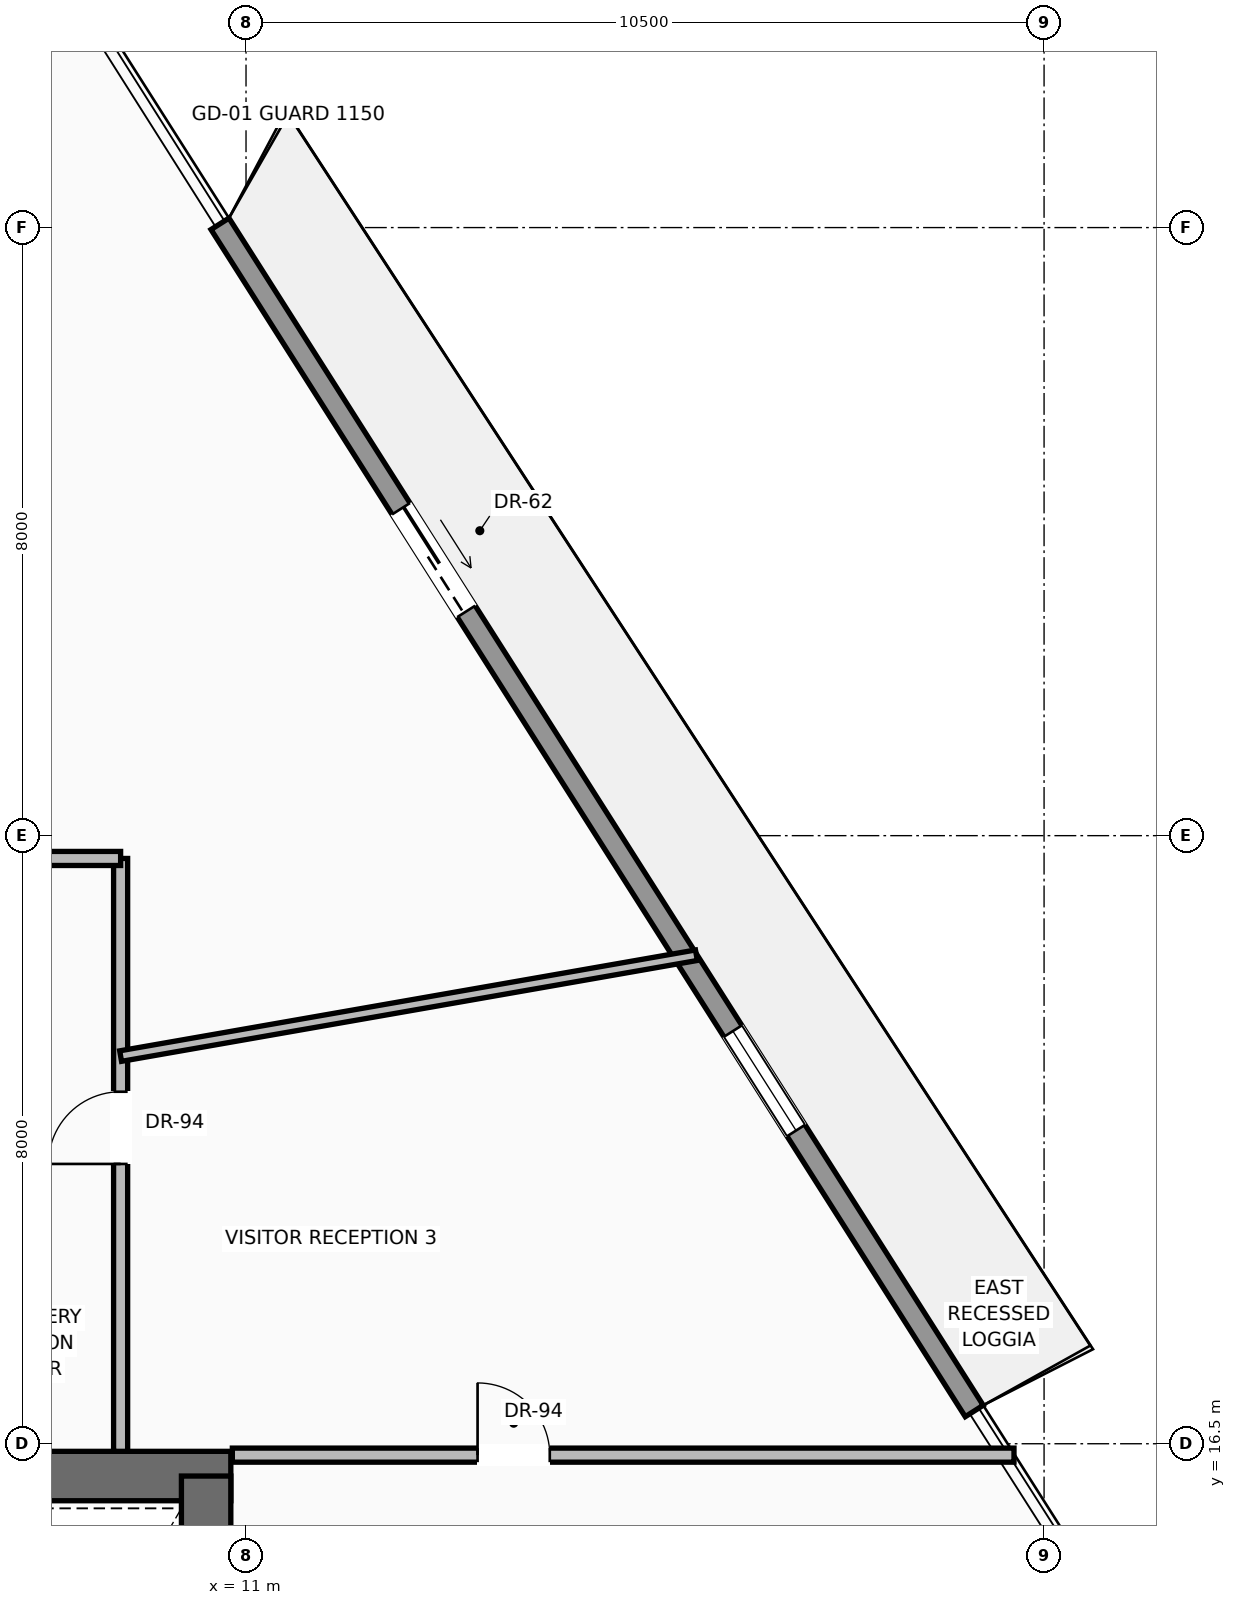
"""IFC4 building model, lengths in metres.
Left out: names, types, materials, properties, quantities, classifications, styles, units other than length and angle.
Written with IfcOpenShell. Run it as: python <this file> out.ifc"""

import sys

from ifc_helpers import new_model, si_unit, direction, frame, frame_2d, origin, place, context, subcontext, project, spatial, rectangle, extrude, source, transform, mapped, element, fill, save


model = new_model("IFC4")
c1 = context("Model", 3, precision=1e-05, world=origin(), true_north=direction((0.0, 1.0)))
c2 = subcontext(c1, "Body", "Model", "MODEL_VIEW")
j1 = project(units=[si_unit("LENGTHUNIT", "METRE"), si_unit("PLANEANGLEUNIT", "RADIAN")], contexts=[c1])
p1 = place(None, origin())
s1 = spatial("IfcSite", under=j1, at=p1, CompositionType="ELEMENT")
p2 = place(p1, origin())
s2 = spatial("IfcBuilding", under=s1, at=p2, CompositionType="ELEMENT")
p3 = place(p2, frame((0.0, 0.0, 162.6)))
s3 = spatial("IfcBuildingStorey", under=s2, at=p3, CompositionType="ELEMENT", Elevation=162.6)
p4 = place(p3, frame((-10.8, 16.075, 0.0), z_axis=(0.0, 0.0, 1.0), x_axis=(1.0, 0.0, 0.0)))
e1 = element("IfcWall", 1, at=p4, inside=s3, PredefinedType="SHEAR", context=c2, shape_type="SweptSolid", body=[
    extrude(rectangle(XDim=21.6, YDim=0.65, at=frame_2d((10.8, 0.0))), origin(), (0.0, 0.0, 1.0), 3.4),
])
p5 = place(p4, frame((3.37, 0.0, 0.0)))
e2 = element("IfcOpeningElement", 2, at=p5, cuts=e1, PredefinedType="OPENING", context=c2, shape_type="SweptSolid", body=[
    extrude(rectangle(XDim=1.3, YDim=2.3, at=frame_2d((0.65, 1.15))), frame((0.0, 0.335, 0.0), z_axis=(0.0, -1.0, 0.0), x_axis=(1.0, 0.0, 0.0)), (0.0, 0.0, 1.0), 0.67),
])
p6 = place(p4, frame((9.8, 0.0, 0.0)))
e3 = element("IfcOpeningElement", 3, at=p6, cuts=e1, PredefinedType="OPENING", context=c2, shape_type="SweptSolid", body=[
    extrude(rectangle(XDim=2.0, YDim=2.4, at=frame_2d((1.0, 1.2))), frame((0.0, 0.335, 0.0), z_axis=(0.0, -1.0, 0.0), x_axis=(1.0, 0.0, 0.0)), (0.0, 0.0, 1.0), 0.67),
])
p7 = place(p3, frame((10.475, 0.525, 0.0), z_axis=(0.0, 0.0, 1.0), x_axis=(0.0, 1.0, 0.0)))
e4 = element("IfcWall", 4, at=p7, inside=s3, PredefinedType="SHEAR", context=c2, shape_type="SweptSolid", body=[
    extrude(rectangle(XDim=15.55, YDim=0.65, at=frame_2d((7.775, 0.0))), origin(), (0.0, 0.0, 1.0), 3.4),
])
p8 = place(p3, frame((10.658, 32.549, 0.0), z_axis=(0.0, 0.0, 1.0), x_axis=(0.536276914683, -0.844042102491, 0.0)))
e5 = element("IfcWall", 5, at=p8, inside=s3, PredefinedType="SOLIDWALL", context=c2, shape_type="SweptSolid", body=[
    extrude(rectangle(XDim=18.505, YDim=0.28, at=frame_2d((9.252, 0.0))), origin(), (0.0, 0.0, 1.0), 2.98),
])
p9 = place(p8, frame((4.441, 0.0, 0.0)))
e6 = element("IfcOpeningElement", 6, at=p9, cuts=e5, PredefinedType="OPENING", context=c2, shape_type="SweptSolid", body=[
    extrude(rectangle(XDim=1.6, YDim=2.35, at=frame_2d((0.8, 1.175))), frame((0.0, 0.15, 0.0), z_axis=(0.0, -1.0, 0.0), x_axis=(1.0, 0.0, 0.0)), (0.0, 0.0, 1.0), 0.3),
])
p10 = place(p8, frame((12.583, 0.0, 0.9)))
e7 = element("IfcOpeningElement", 7, at=p10, cuts=e5, PredefinedType="OPENING", context=c2, shape_type="SweptSolid", body=[
    extrude(rectangle(XDim=1.55, YDim=1.85, at=frame_2d((0.775, 0.925))), frame((0.0, 0.15, 0.0), z_axis=(0.0, -1.0, 0.0), x_axis=(1.0, 0.0, 0.0)), (0.0, 0.0, 1.0), 0.3),
])
p11 = place(p3, frame((9.35, 16.4, 0.0), z_axis=(0.0, 0.0, 1.0), x_axis=(0.0, 1.0, 0.0)))
e8 = element("IfcWall", 8, at=p11, inside=s3, PredefinedType="PARTITIONING", context=c2, shape_type="SweptSolid", body=[
    extrude(rectangle(XDim=7.8, YDim=0.185, at=frame_2d((3.9, 0.0))), origin(), (0.0, 0.0, 1.0), 3.392),
])
p12 = place(p11, frame((3.781, 0.0, 0.0)))
e9 = element("IfcOpeningElement", 9, at=p12, cuts=e8, PredefinedType="OPENING", context=c2, shape_type="SweptSolid", body=[
    extrude(rectangle(XDim=0.95, YDim=2.2, at=frame_2d((0.475, 1.1))), frame((0.0, 0.103, 0.0), z_axis=(0.0, -1.0, 0.0), x_axis=(1.0, 0.0, 0.0)), (0.0, 0.0, 1.0), 0.205),
])
p13 = place(p3, frame((7.15, 24.2, 0.0), z_axis=(0.0, 0.0, 1.0), x_axis=(1.0, 0.0, 0.0)))
e10 = element("IfcWall", 10, at=p13, inside=s3, PredefinedType="PARTITIONING", context=c2, shape_type="SweptSolid", body=[
    extrude(rectangle(XDim=2.2, YDim=0.185, at=frame_2d((1.1, 0.0))), origin(), (0.0, 0.0, 1.0), 3.392),
])
p14 = place(p3, frame((10.82, 16.35, 0.0), z_axis=(0.0, 0.0, 1.0), x_axis=(1.0, 0.0, 0.0)))
e11 = element("IfcWall", 11, at=p14, inside=s3, PredefinedType="PARTITIONING", context=c2, shape_type="SweptSolid", body=[
    extrude(rectangle(XDim=10.284, YDim=0.185, at=frame_2d((5.142, 0.0))), origin(), (0.0, 0.0, 1.0), 3.392),
])
p15 = place(p14, frame((3.227, 0.0, 0.0)))
e12 = element("IfcOpeningElement", 12, at=p15, cuts=e11, PredefinedType="OPENING", context=c2, shape_type="SweptSolid", body=[
    extrude(rectangle(XDim=0.95, YDim=2.2, at=frame_2d((0.475, 1.1))), frame((0.0, 0.103, 0.0), z_axis=(0.0, -1.0, 0.0), x_axis=(1.0, 0.0, 0.0)), (0.0, 0.0, 1.0), 0.205),
])
p16 = place(p3, frame((9.35, 21.6, 0.0), z_axis=(0.0, 0.0, 1.0), x_axis=(0.985009302956, 0.172501226345, 0.0)))
e13 = element("IfcWall", 13, at=p16, inside=s3, PredefinedType="PARTITIONING", context=c2, shape_type="SweptSolid", body=[
    extrude(rectangle(XDim=7.691, YDim=0.14, at=frame_2d((3.845, 0.0))), origin(), (0.0, 0.0, 1.0), 2.979),
])
m1 = source(origin(), c2, "Body", "SweptSolid", [
    extrude(rectangle(XDim=1.6, YDim=2.35, at=frame_2d((0.8, 1.175))), frame((0.0, 0.025, 0.0), z_axis=(0.0, -1.0, 0.0), x_axis=(1.0, 0.0, 0.0)), (0.0, 0.0, 1.0), 0.05),
])
p17 = place(p9, origin())
e14 = element("IfcDoor", 14, at=p17, inside=s3, OperationType="SLIDING_TO_RIGHT", PredefinedType="DOOR", context=c2, shape_type="MappedRepresentation", body=[
    mapped(m1, transform((0.0, 0.0, 0.0), scale=1.0)),
])
fill(e6, e14)
m2 = source(origin(), c2, "Body", "SweptSolid", [
    extrude(rectangle(XDim=1.55, YDim=1.85, at=frame_2d((0.775, 0.925))), frame((0.0, 0.03, 0.0), z_axis=(0.0, -1.0, 0.0), x_axis=(1.0, 0.0, 0.0)), (0.0, 0.0, 1.0), 0.06),
])
p18 = place(p10, origin())
e15 = element("IfcWindow", 15, at=p18, inside=s3, PartitioningType="SINGLE_PANEL", PredefinedType="WINDOW", context=c2, shape_type="MappedRepresentation", body=[
    mapped(m2, transform((0.0, 0.0, 0.0), scale=1.0)),
])
fill(e7, e15)
m3 = source(origin(), c2, "Body", "SweptSolid", [
    extrude(rectangle(XDim=0.95, YDim=2.2, at=frame_2d((0.475, 1.1))), frame((0.0, 0.025, 0.0), z_axis=(0.0, -1.0, 0.0), x_axis=(1.0, 0.0, 0.0)), (0.0, 0.0, 1.0), 0.05),
])
p19 = place(p12, origin())
e16 = element("IfcDoor", 16, at=p19, inside=s3, OperationType="SINGLE_SWING_LEFT", PredefinedType="DOOR", context=c2, shape_type="MappedRepresentation", body=[
    mapped(m3, transform((0.0, 0.0, 0.0), scale=1.0)),
])
fill(e9, e16)
p20 = place(p15, origin())
e17 = element("IfcDoor", 17, at=p20, inside=s3, OperationType="SINGLE_SWING_LEFT", PredefinedType="DOOR", context=c2, shape_type="MappedRepresentation", body=[
    mapped(m3, transform((0.0, 0.0, 0.0), scale=1.0)),
])
fill(e12, e17)
save(model, sys.argv[1])
